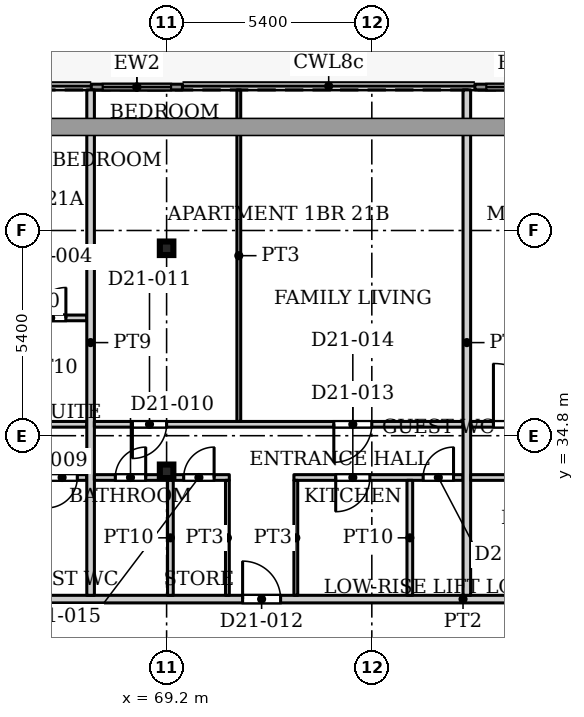
"""IFC4 building model, lengths in metres.
Left out: names, types, materials, properties, quantities, classifications, styles, units other than length and angle.
Written with IfcOpenShell. Run it as: python <this file> out.ifc"""

import sys

from ifc_helpers import new_model, si_unit, direction, frame, frame_2d, origin, origin_2d, place, context, subcontext, project, spatial, rectangle, hollow_rectangle, extrude, source, transform, mapped, element, fill, save


model = new_model("IFC4")
c1 = context("Model", 3, precision=1e-05, world=origin(), true_north=direction((0.0, 1.0)))
c2 = subcontext(c1, "Body", "Model", "MODEL_VIEW")
j1 = project(units=[si_unit("LENGTHUNIT", "METRE"), si_unit("PLANEANGLEUNIT", "RADIAN")], contexts=[c1])
p1 = place(None, origin())
s1 = spatial("IfcSite", under=j1, at=p1, CompositionType="ELEMENT")
p2 = place(p1, origin())
s2 = spatial("IfcBuilding", under=s1, at=p2, CompositionType="ELEMENT")
p3 = place(p2, frame((0.0, 0.0, 94.1)))
s3 = spatial("IfcBuildingStorey", under=s2, at=p3, CompositionType="ELEMENT", Elevation=94.1)
for number, where, z_axis, x_axis in (
    (1, (69.2, 33.863, 0.0), (0.0, 0.0, 1.0), (1.0, 0.0, 0.0)),
    (2, (69.2, 39.732, 0.0), (0.0, 0.0, 1.0), (1.0, 0.0, 0.0)),
):
    element("IfcColumn", number, at=place(p3, frame(where, z_axis=z_axis, x_axis=x_axis)), inside=s3, PredefinedType="COLUMN", context=c2, shape_type="SweptSolid", body=[
        extrude(hollow_rectangle(XDim=0.356, YDim=0.356, WallThickness=0.016, InnerFilletRadius=0.016, OuterFilletRadius=0.032, at=origin_2d()), origin(), (0.0, 0.0, 1.0), 3.9),
    ])
p4 = place(p3, frame((67.218, 43.975, 0.0), z_axis=(0.0, 0.0, 1.0), x_axis=(1.0, 0.0, 0.0)))
e3 = element("IfcWall", 3, at=p4, inside=s3, PredefinedType="SOLIDWALL", context=c2, shape_type="SweptSolid", body=[
    extrude(rectangle(XDim=2.4, YDim=0.15, at=frame_2d((1.2, 0.0))), origin(), (0.0, 0.0, 1.0), 3.75),
])
p5 = place(p4, frame((0.3, 0.0, 0.0)))
e4 = element("IfcOpeningElement", 4, at=p5, cuts=e3, PredefinedType="OPENING", context=c2, shape_type="SweptSolid", body=[
    extrude(rectangle(XDim=1.8, YDim=2.4, at=frame_2d((0.9, 1.2))), frame((0.0, 0.085, 0.0), z_axis=(0.0, -1.0, 0.0), x_axis=(1.0, 0.0, 0.0)), (0.0, 0.0, 1.0), 0.17),
])
p6 = place(p3, frame((77.312, 43.975, 0.0), z_axis=(0.0, 0.0, 1.0), x_axis=(1.0, 0.0, 0.0)))
e5 = element("IfcWall", 5, at=p6, inside=s3, PredefinedType="SOLIDWALL", context=c2, shape_type="SweptSolid", body=[
    extrude(rectangle(XDim=2.4, YDim=0.15, at=frame_2d((1.2, 0.0))), origin(), (0.0, 0.0, 1.0), 3.75),
])
p7 = place(p6, frame((0.3, 0.0, 0.0)))
e6 = element("IfcOpeningElement", 6, at=p7, cuts=e5, PredefinedType="OPENING", context=c2, shape_type="SweptSolid", body=[
    extrude(rectangle(XDim=1.8, YDim=2.4, at=frame_2d((0.9, 1.2))), frame((0.0, 0.085, 0.0), z_axis=(0.0, -1.0, 0.0), x_axis=(1.0, 0.0, 0.0)), (0.0, 0.0, 1.0), 0.17),
])
p8 = place(p3, frame((55.9, 30.5, 0.0), z_axis=(0.0, 0.0, 1.0), x_axis=(1.0, 0.0, 0.0)))
e7 = element("IfcWall", 7, at=p8, inside=s3, PredefinedType="PARTITIONING", context=c2, shape_type="SweptSolid", body=[
    extrude(rectangle(XDim=42.2, YDim=0.2, at=frame_2d((21.1, 0.0))), origin(), (0.0, 0.0, 1.0), 3.6),
])
p9 = place(p8, frame((2.7, 0.0, 0.0)))
e8 = element("IfcOpeningElement", 8, at=p9, cuts=e7, PredefinedType="OPENING", context=c2, shape_type="SweptSolid", body=[
    extrude(rectangle(XDim=1.0, YDim=2.1, at=frame_2d((0.5, 1.05))), frame((0.0, 0.11, 0.0), z_axis=(0.0, -1.0, 0.0), x_axis=(1.0, 0.0, 0.0)), (0.0, 0.0, 1.0), 0.22),
])
p10 = place(p8, frame((15.3, 0.0, 0.0)))
e9 = element("IfcOpeningElement", 9, at=p10, cuts=e7, PredefinedType="OPENING", context=c2, shape_type="SweptSolid", body=[
    extrude(rectangle(XDim=1.0, YDim=2.1, at=frame_2d((0.5, 1.05))), frame((0.0, 0.11, 0.0), z_axis=(0.0, -1.0, 0.0), x_axis=(1.0, 0.0, 0.0)), (0.0, 0.0, 1.0), 0.22),
])
p11 = place(p8, frame((33.3, 0.0, 0.0)))
e10 = element("IfcOpeningElement", 10, at=p11, cuts=e7, PredefinedType="OPENING", context=c2, shape_type="SweptSolid", body=[
    extrude(rectangle(XDim=1.0, YDim=2.1, at=frame_2d((0.5, 1.05))), frame((0.0, 0.11, 0.0), z_axis=(0.0, -1.0, 0.0), x_axis=(1.0, 0.0, 0.0)), (0.0, 0.0, 1.0), 0.22),
])
p12 = place(p3, frame((55.9, 35.1, 0.0), z_axis=(0.0, 0.0, 1.0), x_axis=(1.0, 0.0, 0.0)))
e11 = element("IfcWall", 11, at=p12, inside=s3, PredefinedType="PARTITIONING", context=c2, shape_type="SweptSolid", body=[
    extrude(rectangle(XDim=11.2, YDim=0.15, at=frame_2d((5.6, 0.0))), origin(), (0.0, 0.0, 1.0), 3.6),
])
p13 = place(p12, frame((1.4, 0.0, 0.0)))
e12 = element("IfcOpeningElement", 12, at=p13, cuts=e11, PredefinedType="OPENING", context=c2, shape_type="SweptSolid", body=[
    extrude(rectangle(XDim=0.9, YDim=2.1, at=frame_2d((0.45, 1.05))), frame((0.0, 0.085, 0.0), z_axis=(0.0, -1.0, 0.0), x_axis=(1.0, 0.0, 0.0)), (0.0, 0.0, 1.0), 0.17),
])
p14 = place(p12, frame((5.1, 0.0, 0.0)))
e13 = element("IfcOpeningElement", 13, at=p14, cuts=e11, PredefinedType="OPENING", context=c2, shape_type="SweptSolid", body=[
    extrude(rectangle(XDim=1.0, YDim=2.1, at=frame_2d((0.5, 1.05))), frame((0.0, 0.085, 0.0), z_axis=(0.0, -1.0, 0.0), x_axis=(1.0, 0.0, 0.0)), (0.0, 0.0, 1.0), 0.17),
])
p15 = place(p12, frame((7.85, 0.0, 0.0)))
e14 = element("IfcOpeningElement", 14, at=p15, cuts=e11, PredefinedType="OPENING", context=c2, shape_type="SweptSolid", body=[
    extrude(rectangle(XDim=0.9, YDim=2.1, at=frame_2d((0.45, 1.05))), frame((0.0, 0.085, 0.0), z_axis=(0.0, -1.0, 0.0), x_axis=(1.0, 0.0, 0.0)), (0.0, 0.0, 1.0), 0.17),
])
p16 = place(p3, frame((59.95, 33.7, 0.0), z_axis=(0.0, 0.0, 1.0), x_axis=(1.0, 0.0, 0.0)))
e15 = element("IfcWall", 15, at=p16, inside=s3, PredefinedType="PARTITIONING", context=c2, shape_type="SweptSolid", body=[
    extrude(rectangle(XDim=7.15, YDim=0.15, at=frame_2d((3.575, 0.0))), origin(), (0.0, 0.0, 1.0), 3.6),
])
p17 = place(p16, frame((4.15, 0.0, 0.0)))
e16 = element("IfcOpeningElement", 16, at=p17, cuts=e15, PredefinedType="OPENING", context=c2, shape_type="SweptSolid", body=[
    extrude(rectangle(XDim=0.8, YDim=2.1, at=frame_2d((0.4, 1.05))), frame((0.0, 0.085, 0.0), z_axis=(0.0, -1.0, 0.0), x_axis=(1.0, 0.0, 0.0)), (0.0, 0.0, 1.0), 0.17),
])
p18 = place(p16, frame((1.25, 0.0, 0.0)))
e17 = element("IfcOpeningElement", 17, at=p18, cuts=e15, PredefinedType="OPENING", context=c2, shape_type="SweptSolid", body=[
    extrude(rectangle(XDim=0.9, YDim=2.1, at=frame_2d((0.45, 1.05))), frame((0.0, 0.085, 0.0), z_axis=(0.0, -1.0, 0.0), x_axis=(1.0, 0.0, 0.0)), (0.0, 0.0, 1.0), 0.17),
])
p19 = place(p16, frame((6.1, 0.0, 0.0)))
e18 = element("IfcOpeningElement", 18, at=p19, cuts=e15, PredefinedType="OPENING", context=c2, shape_type="SweptSolid", body=[
    extrude(rectangle(XDim=0.8, YDim=2.1, at=frame_2d((0.4, 1.05))), frame((0.0, 0.085, 0.0), z_axis=(0.0, -1.0, 0.0), x_axis=(1.0, 0.0, 0.0)), (0.0, 0.0, 1.0), 0.17),
])
p20 = place(p3, frame((65.175, 37.9, 0.0), z_axis=(0.0, 0.0, 1.0), x_axis=(1.0, 0.0, 0.0)))
e19 = element("IfcWall", 19, at=p20, inside=s3, PredefinedType="PARTITIONING", context=c2, shape_type="SweptSolid", body=[
    extrude(rectangle(XDim=1.925, YDim=0.15, at=frame_2d((0.962, 0.0))), origin(), (0.0, 0.0, 1.0), 3.6),
])
p21 = place(p20, frame((0.575, 0.0, 0.0)))
e20 = element("IfcOpeningElement", 20, at=p21, cuts=e19, PredefinedType="OPENING", context=c2, shape_type="SweptSolid", body=[
    extrude(rectangle(XDim=0.8, YDim=2.1, at=frame_2d((0.4, 1.05))), frame((0.0, 0.085, 0.0), z_axis=(0.0, -1.0, 0.0), x_axis=(1.0, 0.0, 0.0)), (0.0, 0.0, 1.0), 0.17),
])
p22 = place(p3, frame((67.2, 30.6, 0.0), z_axis=(0.0, 0.0, 1.0), x_axis=(0.0, 1.0, 0.0)))
e21 = element("IfcWall", 21, at=p22, inside=s3, PredefinedType="PARTITIONING", context=c2, shape_type="SweptSolid", body=[
    extrude(rectangle(XDim=13.3, YDim=0.2, at=frame_2d((6.65, 0.0))), origin(), (0.0, 0.0, 1.0), 3.6),
])
p23 = place(p3, frame((67.3, 33.7, 0.0), z_axis=(0.0, 0.0, 1.0), x_axis=(1.0, 0.0, 0.0)))
e22 = element("IfcWall", 22, at=p23, inside=s3, PredefinedType="PARTITIONING", context=c2, shape_type="SweptSolid", body=[
    extrude(rectangle(XDim=3.55, YDim=0.15, at=frame_2d((1.775, 0.0))), origin(), (0.0, 0.0, 1.0), 3.6),
])
p24 = place(p23, frame((0.55, 0.0, 0.0)))
e23 = element("IfcOpeningElement", 23, at=p24, cuts=e22, PredefinedType="OPENING", context=c2, shape_type="SweptSolid", body=[
    extrude(rectangle(XDim=0.8, YDim=2.1, at=frame_2d((0.4, 1.05))), frame((0.0, 0.085, 0.0), z_axis=(0.0, -1.0, 0.0), x_axis=(1.0, 0.0, 0.0)), (0.0, 0.0, 1.0), 0.17),
])
p25 = place(p23, frame((2.35, 0.0, 0.0)))
e24 = element("IfcOpeningElement", 24, at=p25, cuts=e22, PredefinedType="OPENING", context=c2, shape_type="SweptSolid", body=[
    extrude(rectangle(XDim=0.8, YDim=2.1, at=frame_2d((0.4, 1.05))), frame((0.0, 0.085, 0.0), z_axis=(0.0, -1.0, 0.0), x_axis=(1.0, 0.0, 0.0)), (0.0, 0.0, 1.0), 0.17),
])
p26 = place(p3, frame((67.3, 35.1, 0.0), z_axis=(0.0, 0.0, 1.0), x_axis=(1.0, 0.0, 0.0)))
e25 = element("IfcWall", 25, at=p26, inside=s3, PredefinedType="PARTITIONING", context=c2, shape_type="SweptSolid", body=[
    extrude(rectangle(XDim=9.7, YDim=0.15, at=frame_2d((4.85, 0.0))), origin(), (0.0, 0.0, 1.0), 3.6),
])
p27 = place(p26, frame((1.0, 0.0, 0.0)))
e26 = element("IfcOpeningElement", 26, at=p27, cuts=e25, PredefinedType="OPENING", context=c2, shape_type="SweptSolid", body=[
    extrude(rectangle(XDim=0.9, YDim=2.1, at=frame_2d((0.45, 1.05))), frame((0.0, 0.085, 0.0), z_axis=(0.0, -1.0, 0.0), x_axis=(1.0, 0.0, 0.0)), (0.0, 0.0, 1.0), 0.17),
])
p28 = place(p26, frame((6.3, 0.0, 0.0)))
e27 = element("IfcOpeningElement", 27, at=p28, cuts=e25, PredefinedType="OPENING", context=c2, shape_type="SweptSolid", body=[
    extrude(rectangle(XDim=1.0, YDim=2.1, at=frame_2d((0.5, 1.05))), frame((0.0, 0.085, 0.0), z_axis=(0.0, -1.0, 0.0), x_axis=(1.0, 0.0, 0.0)), (0.0, 0.0, 1.0), 0.17),
])
p29 = place(p3, frame((69.3, 30.6, 0.0), z_axis=(0.0, 0.0, 1.0), x_axis=(0.0, 1.0, 0.0)))
e28 = element("IfcWall", 28, at=p29, inside=s3, PredefinedType="PARTITIONING", context=c2, shape_type="SweptSolid", body=[
    extrude(rectangle(XDim=3.025, YDim=0.15, at=frame_2d((1.512, 0.0))), origin(), (0.0, 0.0, 1.0), 3.6),
])
p30 = place(p3, frame((70.8, 30.6, 0.0), z_axis=(0.0, 0.0, 1.0), x_axis=(0.0, 1.0, 0.0)))
e29 = element("IfcWall", 29, at=p30, inside=s3, PredefinedType="PARTITIONING", context=c2, shape_type="SweptSolid", body=[
    extrude(rectangle(XDim=3.025, YDim=0.1, at=frame_2d((1.512, 0.0))), origin(), (0.0, 0.0, 1.0), 3.6),
])
p31 = place(p3, frame((71.1, 35.175, 0.0), z_axis=(0.0, 0.0, 1.0), x_axis=(0.0, 1.0, 0.0)))
e30 = element("IfcWall", 30, at=p31, inside=s3, PredefinedType="PARTITIONING", context=c2, shape_type="SweptSolid", body=[
    extrude(rectangle(XDim=8.725, YDim=0.1, at=frame_2d((4.362, 0.0))), origin(), (0.0, 0.0, 1.0), 3.6),
])
p32 = place(p3, frame((72.55, 33.7, 0.0), z_axis=(0.0, 0.0, 1.0), x_axis=(1.0, 0.0, 0.0)))
e31 = element("IfcWall", 31, at=p32, inside=s3, PredefinedType="PARTITIONING", context=c2, shape_type="SweptSolid", body=[
    extrude(rectangle(XDim=4.45, YDim=0.15, at=frame_2d((2.225, 0.0))), origin(), (0.0, 0.0, 1.0), 3.6),
])
p33 = place(p32, frame((1.1, 0.0, 0.0)))
e32 = element("IfcOpeningElement", 32, at=p33, cuts=e31, PredefinedType="OPENING", context=c2, shape_type="SweptSolid", body=[
    extrude(rectangle(XDim=0.9, YDim=2.1, at=frame_2d((0.45, 1.05))), frame((0.0, 0.085, 0.0), z_axis=(0.0, -1.0, 0.0), x_axis=(1.0, 0.0, 0.0)), (0.0, 0.0, 1.0), 0.17),
])
p34 = place(p32, frame((3.4, 0.0, 0.0)))
e33 = element("IfcOpeningElement", 33, at=p34, cuts=e31, PredefinedType="OPENING", context=c2, shape_type="SweptSolid", body=[
    extrude(rectangle(XDim=0.8, YDim=2.1, at=frame_2d((0.4, 1.05))), frame((0.0, 0.085, 0.0), z_axis=(0.0, -1.0, 0.0), x_axis=(1.0, 0.0, 0.0)), (0.0, 0.0, 1.0), 0.17),
])
p35 = place(p3, frame((72.6, 30.6, 0.0), z_axis=(0.0, 0.0, 1.0), x_axis=(0.0, 1.0, 0.0)))
e34 = element("IfcWall", 34, at=p35, inside=s3, PredefinedType="PARTITIONING", context=c2, shape_type="SweptSolid", body=[
    extrude(rectangle(XDim=3.025, YDim=0.1, at=frame_2d((1.512, 0.0))), origin(), (0.0, 0.0, 1.0), 3.6),
])
p36 = place(p3, frame((75.6, 30.6, 0.0), z_axis=(0.0, 0.0, 1.0), x_axis=(0.0, 1.0, 0.0)))
e35 = element("IfcWall", 35, at=p36, inside=s3, PredefinedType="PARTITIONING", context=c2, shape_type="SweptSolid", body=[
    extrude(rectangle(XDim=3.025, YDim=0.15, at=frame_2d((1.512, 0.0))), origin(), (0.0, 0.0, 1.0), 3.6),
])
p37 = place(p3, frame((77.1, 30.6, 0.0), z_axis=(0.0, 0.0, 1.0), x_axis=(0.0, 1.0, 0.0)))
e36 = element("IfcWall", 36, at=p37, inside=s3, PredefinedType="PARTITIONING", context=c2, shape_type="SweptSolid", body=[
    extrude(rectangle(XDim=13.3, YDim=0.2, at=frame_2d((6.65, 0.0))), origin(), (0.0, 0.0, 1.0), 3.6),
])
p38 = place(p3, frame((77.2, 33.7, 0.0), z_axis=(0.0, 0.0, 1.0), x_axis=(1.0, 0.0, 0.0)))
e37 = element("IfcWall", 37, at=p38, inside=s3, PredefinedType="PARTITIONING", context=c2, shape_type="SweptSolid", body=[
    extrude(rectangle(XDim=11.375, YDim=0.15, at=frame_2d((5.688, 0.0))), origin(), (0.0, 0.0, 1.0), 3.6),
])
p39 = place(p38, frame((9.4, 0.0, 0.0)))
e38 = element("IfcOpeningElement", 38, at=p39, cuts=e37, PredefinedType="OPENING", context=c2, shape_type="SweptSolid", body=[
    extrude(rectangle(XDim=0.8, YDim=2.1, at=frame_2d((0.4, 1.05))), frame((0.0, 0.085, 0.0), z_axis=(0.0, -1.0, 0.0), x_axis=(1.0, 0.0, 0.0)), (0.0, 0.0, 1.0), 0.17),
])
p40 = place(p38, frame((1.5, 0.0, 0.0)))
e39 = element("IfcOpeningElement", 39, at=p40, cuts=e37, PredefinedType="OPENING", context=c2, shape_type="SweptSolid", body=[
    extrude(rectangle(XDim=0.8, YDim=2.1, at=frame_2d((0.4, 1.05))), frame((0.0, 0.085, 0.0), z_axis=(0.0, -1.0, 0.0), x_axis=(1.0, 0.0, 0.0)), (0.0, 0.0, 1.0), 0.17),
])
p41 = place(p3, frame((77.2, 35.1, 0.0), z_axis=(0.0, 0.0, 1.0), x_axis=(1.0, 0.0, 0.0)))
e40 = element("IfcWall", 40, at=p41, inside=s3, PredefinedType="PARTITIONING", context=c2, shape_type="SweptSolid", body=[
    extrude(rectangle(XDim=22.7, YDim=0.15, at=frame_2d((11.35, 0.0))), origin(), (0.0, 0.0, 1.0), 3.6),
])
p42 = place(p41, frame((4.4, 0.0, 0.0)))
e41 = element("IfcOpeningElement", 41, at=p42, cuts=e40, PredefinedType="OPENING", context=c2, shape_type="SweptSolid", body=[
    extrude(rectangle(XDim=0.9, YDim=2.1, at=frame_2d((0.45, 1.05))), frame((0.0, 0.085, 0.0), z_axis=(0.0, -1.0, 0.0), x_axis=(1.0, 0.0, 0.0)), (0.0, 0.0, 1.0), 0.17),
])
p43 = place(p41, frame((8.3, 0.0, 0.0)))
e42 = element("IfcOpeningElement", 42, at=p43, cuts=e40, PredefinedType="OPENING", context=c2, shape_type="SweptSolid", body=[
    extrude(rectangle(XDim=0.9, YDim=2.1, at=frame_2d((0.45, 1.05))), frame((0.0, 0.085, 0.0), z_axis=(0.0, -1.0, 0.0), x_axis=(1.0, 0.0, 0.0)), (0.0, 0.0, 1.0), 0.17),
])
p44 = place(p41, frame((20.9, 0.0, 0.0)))
e43 = element("IfcOpeningElement", 43, at=p44, cuts=e40, PredefinedType="OPENING", context=c2, shape_type="SweptSolid", body=[
    extrude(rectangle(XDim=0.9, YDim=2.1, at=frame_2d((0.45, 1.05))), frame((0.0, 0.085, 0.0), z_axis=(0.0, -1.0, 0.0), x_axis=(1.0, 0.0, 0.0)), (0.0, 0.0, 1.0), 0.17),
])
p45 = place(p41, frame((17.4, 0.0, 0.0)))
e44 = element("IfcOpeningElement", 44, at=p45, cuts=e40, PredefinedType="OPENING", context=c2, shape_type="SweptSolid", body=[
    extrude(rectangle(XDim=1.0, YDim=2.1, at=frame_2d((0.5, 1.05))), frame((0.0, 0.085, 0.0), z_axis=(0.0, -1.0, 0.0), x_axis=(1.0, 0.0, 0.0)), (0.0, 0.0, 1.0), 0.17),
])
p46 = place(p41, frame((0.6, 0.0, 0.0)))
e45 = element("IfcOpeningElement", 45, at=p46, cuts=e40, PredefinedType="OPENING", context=c2, shape_type="SweptSolid", body=[
    extrude(rectangle(XDim=1.6, YDim=2.1, at=frame_2d((0.8, 1.05))), frame((0.0, 0.085, 0.0), z_axis=(0.0, -1.0, 0.0), x_axis=(1.0, 0.0, 0.0)), (0.0, 0.0, 1.0), 0.17),
])
p47 = place(p41, frame((11.75, 0.0, 0.0)))
e46 = element("IfcOpeningElement", 46, at=p47, cuts=e40, PredefinedType="OPENING", context=c2, shape_type="SweptSolid", body=[
    extrude(rectangle(XDim=0.9, YDim=2.1, at=frame_2d((0.45, 1.05))), frame((0.0, 0.085, 0.0), z_axis=(0.0, -1.0, 0.0), x_axis=(1.0, 0.0, 0.0)), (0.0, 0.0, 1.0), 0.17),
])
m1 = source(origin(), c2, "Body", "SweptSolid", [
    extrude(rectangle(XDim=1.8, YDim=2.4, at=frame_2d((0.9, 1.2))), frame((0.0, 0.025, 0.0), z_axis=(0.0, -1.0, 0.0), x_axis=(1.0, 0.0, 0.0)), (0.0, 0.0, 1.0), 0.05),
])
p48 = place(p5, origin())
e47 = element("IfcDoor", 47, at=p48, inside=s3, OperationType="SLIDING_TO_LEFT", PredefinedType="DOOR", context=c2, shape_type="MappedRepresentation", body=[
    mapped(m1, transform((0.0, 0.0, 0.0), x_axis=(1.0, 0.0, 0.0), y_axis=(0.0, 1.0, 0.0), z_axis=(0.0, 0.0, 1.0), scale=1.0)),
])
fill(e4, e47)
p49 = place(p7, origin())
e48 = element("IfcDoor", 48, at=p49, inside=s3, OperationType="SLIDING_TO_LEFT", PredefinedType="DOOR", context=c2, shape_type="MappedRepresentation", body=[
    mapped(m1, transform((0.0, 0.0, 0.0), x_axis=(1.0, 0.0, 0.0), y_axis=(0.0, 1.0, 0.0), z_axis=(0.0, 0.0, 1.0), scale=1.0)),
])
fill(e6, e48)
m2 = source(origin(), c2, "Body", "SweptSolid", [
    extrude(rectangle(XDim=0.8, YDim=2.1, at=frame_2d((0.4, 1.05))), frame((0.0, 0.025, 0.0), z_axis=(0.0, -1.0, 0.0), x_axis=(1.0, 0.0, 0.0)), (0.0, 0.0, 1.0), 0.05),
])
p50 = place(p21, origin())
e49 = element("IfcDoor", 49, at=p50, inside=s3, OperationType="SINGLE_SWING_LEFT", PredefinedType="DOOR", context=c2, shape_type="MappedRepresentation", body=[
    mapped(m2, transform((0.0, 0.0, 0.0), x_axis=(1.0, 0.0, 0.0), y_axis=(0.0, 1.0, 0.0), z_axis=(0.0, 0.0, 1.0), scale=1.0)),
])
fill(e20, e49)
p51 = place(p19, origin())
e50 = element("IfcDoor", 50, at=p51, inside=s3, OperationType="SINGLE_SWING_RIGHT", PredefinedType="DOOR", context=c2, shape_type="MappedRepresentation", body=[
    mapped(m2, transform((0.0, 0.0, 0.0), x_axis=(1.0, 0.0, 0.0), y_axis=(0.0, 1.0, 0.0), z_axis=(0.0, 0.0, 1.0), scale=1.0)),
])
fill(e18, e50)
p52 = place(p24, origin())
e51 = element("IfcDoor", 51, at=p52, inside=s3, OperationType="SINGLE_SWING_LEFT", PredefinedType="DOOR", context=c2, shape_type="MappedRepresentation", body=[
    mapped(m2, transform((0.0, 0.0, 0.0), x_axis=(1.0, 0.0, 0.0), y_axis=(0.0, 1.0, 0.0), z_axis=(0.0, 0.0, 1.0), scale=1.0)),
])
fill(e23, e51)
m3 = source(origin(), c2, "Body", "SweptSolid", [
    extrude(rectangle(XDim=0.9, YDim=2.1, at=frame_2d((0.45, 1.05))), frame((0.0, 0.025, 0.0), z_axis=(0.0, -1.0, 0.0), x_axis=(1.0, 0.0, 0.0)), (0.0, 0.0, 1.0), 0.05),
])
p53 = place(p27, origin())
e52 = element("IfcDoor", 52, at=p53, inside=s3, OperationType="SINGLE_SWING_RIGHT", PredefinedType="DOOR", context=c2, shape_type="MappedRepresentation", body=[
    mapped(m3, transform((0.0, 0.0, 0.0), x_axis=(1.0, 0.0, 0.0), y_axis=(0.0, 1.0, 0.0), z_axis=(0.0, 0.0, 1.0), scale=1.0)),
])
fill(e26, e52)
m4 = source(origin(), c2, "Body", "SweptSolid", [
    extrude(rectangle(XDim=1.0, YDim=2.1, at=frame_2d((0.5, 1.05))), frame((0.0, 0.025, 0.0), z_axis=(0.0, -1.0, 0.0), x_axis=(1.0, 0.0, 0.0)), (0.0, 0.0, 1.0), 0.05),
])
p54 = place(p10, origin())
e53 = element("IfcDoor", 53, at=p54, inside=s3, OperationType="SINGLE_SWING_LEFT", PredefinedType="DOOR", context=c2, shape_type="MappedRepresentation", body=[
    mapped(m4, transform((0.0, 0.0, 0.0), x_axis=(1.0, 0.0, 0.0), y_axis=(0.0, 1.0, 0.0), z_axis=(0.0, 0.0, 1.0), scale=1.0)),
])
fill(e9, e53)
p55 = place(p33, origin())
e54 = element("IfcDoor", 54, at=p55, inside=s3, OperationType="SINGLE_SWING_RIGHT", PredefinedType="DOOR", context=c2, shape_type="MappedRepresentation", body=[
    mapped(m3, transform((0.0, 0.0, 0.0), x_axis=(1.0, 0.0, 0.0), y_axis=(0.0, 1.0, 0.0), z_axis=(0.0, 0.0, 1.0), scale=1.0)),
])
fill(e32, e54)
m5 = source(origin(), c2, "Body", "SweptSolid", [
    extrude(rectangle(XDim=1.0, YDim=2.1, at=frame_2d((0.5, 1.05))), frame((0.0, 0.025, 0.0), z_axis=(0.0, -1.0, 0.0), x_axis=(1.0, 0.0, 0.0)), (0.0, 0.0, 1.0), 0.05),
])
p56 = place(p28, origin())
e55 = element("IfcDoor", 55, at=p56, inside=s3, OperationType="SINGLE_SWING_RIGHT", PredefinedType="DOOR", context=c2, shape_type="MappedRepresentation", body=[
    mapped(m5, transform((0.0, 0.0, 0.0), x_axis=(1.0, 0.0, 0.0), y_axis=(0.0, 1.0, 0.0), z_axis=(0.0, 0.0, 1.0), scale=1.0)),
])
fill(e27, e55)
p57 = place(p25, origin())
e56 = element("IfcDoor", 56, at=p57, inside=s3, OperationType="SINGLE_SWING_LEFT", PredefinedType="DOOR", context=c2, shape_type="MappedRepresentation", body=[
    mapped(m2, transform((0.0, 0.0, 0.0), x_axis=(1.0, 0.0, 0.0), y_axis=(0.0, 1.0, 0.0), z_axis=(0.0, 0.0, 1.0), scale=1.0)),
])
fill(e24, e56)
p58 = place(p34, origin())
e57 = element("IfcDoor", 57, at=p58, inside=s3, OperationType="SINGLE_SWING_LEFT", PredefinedType="DOOR", context=c2, shape_type="MappedRepresentation", body=[
    mapped(m2, transform((0.0, 0.0, 0.0), x_axis=(1.0, 0.0, 0.0), y_axis=(0.0, 1.0, 0.0), z_axis=(0.0, 0.0, 1.0), scale=1.0)),
])
fill(e33, e57)
m6 = source(origin(), c2, "Body", "SweptSolid", [
    extrude(rectangle(XDim=1.6, YDim=2.1, at=frame_2d((0.8, 1.05))), frame((0.0, 0.025, 0.0), z_axis=(0.0, -1.0, 0.0), x_axis=(1.0, 0.0, 0.0)), (0.0, 0.0, 1.0), 0.05),
])
p59 = place(p46, origin())
e58 = element("IfcDoor", 58, at=p59, inside=s3, OperationType="DOUBLE_DOOR_SINGLE_SWING", PredefinedType="DOOR", context=c2, shape_type="MappedRepresentation", body=[
    mapped(m6, transform((0.0, 0.0, 0.0), x_axis=(1.0, 0.0, 0.0), y_axis=(0.0, 1.0, 0.0), z_axis=(0.0, 0.0, 1.0), scale=1.0)),
])
fill(e45, e58)
save(model, sys.argv[1])
